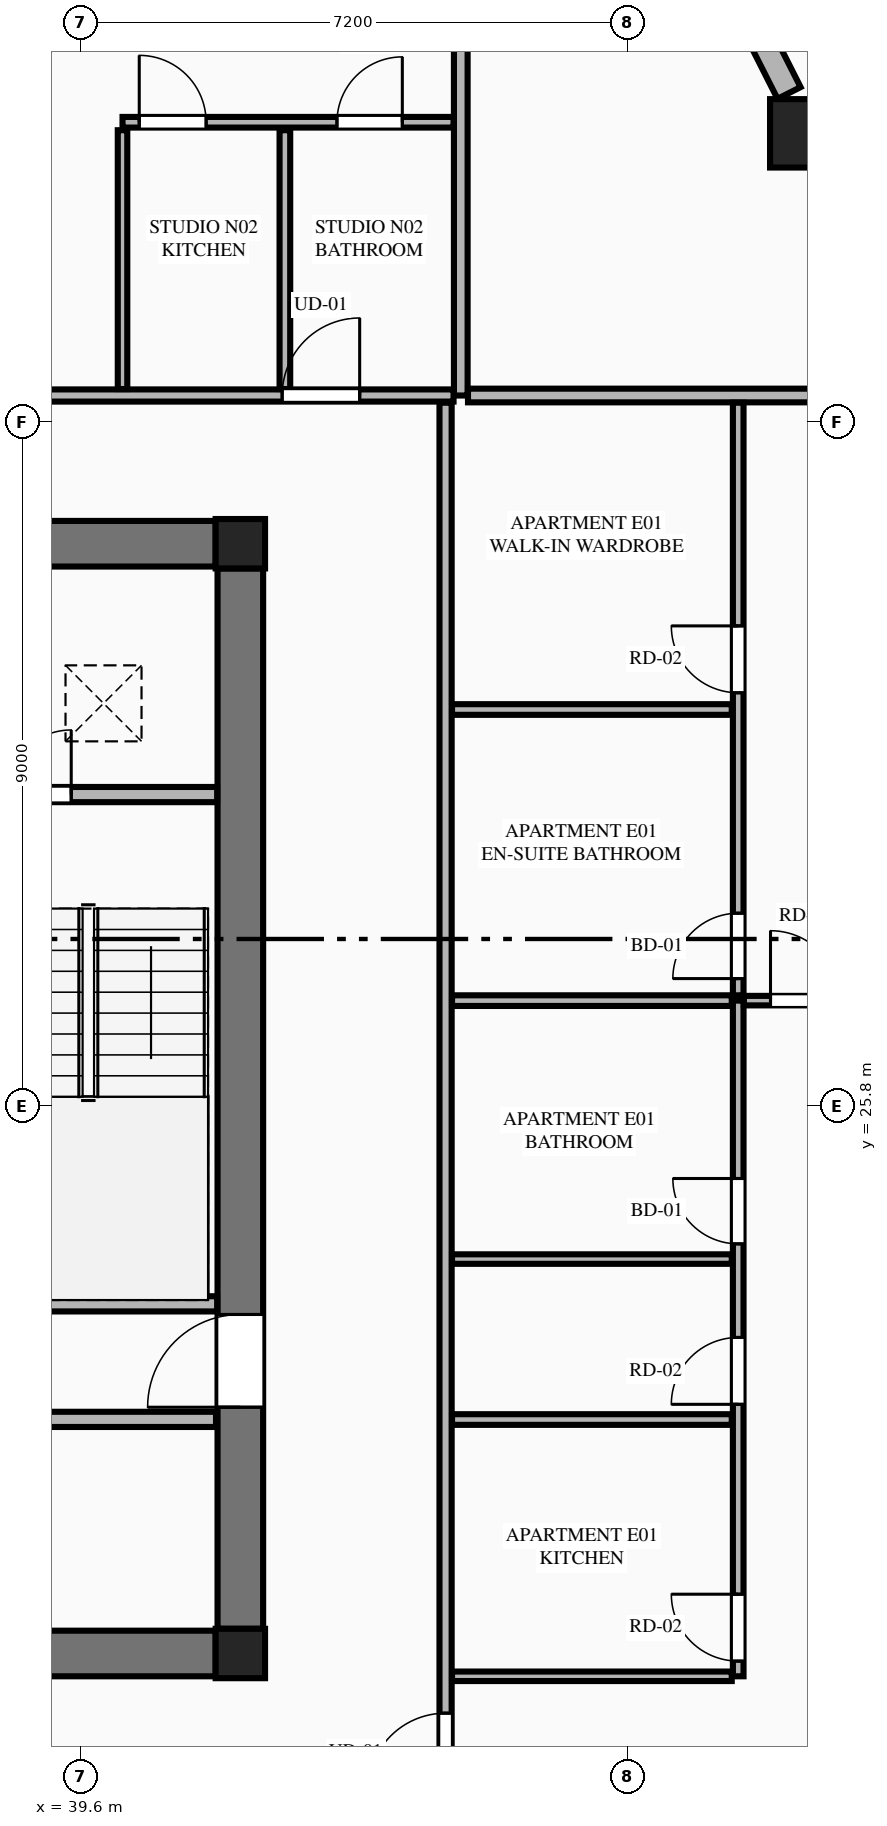
"""IFC4 building model, lengths in metres.
Left out: names, types, materials, properties, quantities, classifications, styles, units other than length and angle.
Written with IfcOpenShell. Run it as: python <this file> out.ifc"""

import sys

from ifc_helpers import new_model, si_unit, direction, frame, frame_2d, origin, origin_2d, place, context, subcontext, project, spatial, rectangle, extrude, element, fill, save


model = new_model("IFC4")
c1 = context("Model", 3, precision=1e-05, world=origin(), true_north=direction((0.0, 1.0)))
c2 = subcontext(c1, "Body", "Model", "MODEL_VIEW")
j1 = project(units=[si_unit("LENGTHUNIT", "METRE"), si_unit("PLANEANGLEUNIT", "RADIAN")], contexts=[c1])
p1 = place(None, origin())
s1 = spatial("IfcSite", under=j1, at=p1, CompositionType="ELEMENT")
p2 = place(p1, origin())
s2 = spatial("IfcBuilding", under=s1, at=p2, CompositionType="ELEMENT")
p3 = place(p2, frame((0.0, 0.0, 182.55)))
s3 = spatial("IfcBuildingStorey", under=s2, at=p3, CompositionType="ELEMENT", Elevation=182.55)
for number, where, z_axis, x_axis in (
    (1, (41.7, 18.6, 0.0), (0.0, 0.0, 1.0), (1.0, 0.0, 0.0)),
    (2, (41.7, 33.2, 0.0), (0.0, 0.0, 1.0), (1.0, 0.0, 0.0)),
):
    element("IfcColumn", number, at=place(p3, frame(where, z_axis=z_axis, x_axis=x_axis)), inside=s3, PredefinedType="COLUMN", context=c2, shape_type="SweptSolid", body=[
        extrude(rectangle(XDim=0.65, YDim=0.65, at=origin_2d()), origin(), (0.0, 0.0, 1.0), 3.55),
    ])
for number, where, z_axis, x_axis in (
    (3, (23.425, 18.6, 0.0), (0.0, 0.0, 1.0), (1.0, 0.0, 0.0)),
    (4, (23.425, 33.2, 0.0), (0.0, 0.0, 1.0), (1.0, 0.0, 0.0)),
):
    element("IfcWall", number, at=place(p3, frame(where, z_axis=z_axis, x_axis=x_axis)), inside=s3, PredefinedType="SHEAR", context=c2, shape_type="SweptSolid", body=[
        extrude(rectangle(XDim=17.95, YDim=0.6, at=frame_2d((8.975, 0.0))), origin(), (0.0, 0.0, 1.0), 3.35),
    ])
p4 = place(p3, frame((41.7, 18.925, 0.0), z_axis=(0.0, 0.0, 1.0), x_axis=(0.0, 1.0, 0.0)))
e5 = element("IfcWall", 5, at=p4, inside=s3, PredefinedType="SHEAR", context=c2, shape_type="SweptSolid", body=[
    extrude(rectangle(XDim=13.95, YDim=0.6, at=frame_2d((6.975, 0.0))), origin(), (0.0, 0.0, 1.0), 3.35),
])
p5 = place(p4, frame((2.915, 0.0, 0.0)))
e6 = element("IfcOpeningElement", 6, at=p5, cuts=e5, PredefinedType="OPENING", context=c2, shape_type="SweptSolid", body=[
    extrude(rectangle(XDim=1.22, YDim=2.25, at=frame_2d((0.61, 1.125))), frame((0.0, 0.31, 0.0), z_axis=(0.0, -1.0, 0.0), x_axis=(1.0, 0.0, 0.0)), (0.0, 0.0, 1.0), 0.62),
])
p6 = place(p3, frame((49.119, 38.599, 0.0), z_axis=(0.0, 0.0, 1.0), x_axis=(1.0, 0.0, 0.0)))
e7 = element("IfcColumn", 7, at=p6, inside=s3, PredefinedType="COLUMN", context=c2, shape_type="SweptSolid", body=[
    extrude(rectangle(XDim=0.9, YDim=0.9, at=origin_2d()), origin(), (0.0, 0.0, 1.0), 3.55),
])
p7 = place(p3, frame((38.125, 23.2, 0.0), z_axis=(0.0, 0.0, 1.0), x_axis=(1.0, 0.0, 0.0)))
e8 = element("IfcWall", 8, at=p7, inside=s3, PredefinedType="PLUMBINGWALL", context=c2, shape_type="SweptSolid", body=[
    extrude(rectangle(XDim=3.27, YDim=0.2, at=frame_2d((1.635, 0.0))), origin(), (0.0, 0.0, 1.0), 3.35),
])
p8 = place(p3, frame((38.125, 29.9, 0.0), z_axis=(0.0, 0.0, 1.0), x_axis=(1.0, 0.0, 0.0)))
e9 = element("IfcWall", 9, at=p8, inside=s3, PredefinedType="PLUMBINGWALL", context=c2, shape_type="SweptSolid", body=[
    extrude(rectangle(XDim=3.27, YDim=0.2, at=frame_2d((1.635, 0.0))), origin(), (0.0, 0.0, 1.0), 3.35),
])
p9 = place(p8, frame((0.5, 0.0, 0.0)))
e10 = element("IfcOpeningElement", 10, at=p9, cuts=e9, PredefinedType="OPENING", context=c2, shape_type="SweptSolid", body=[
    extrude(rectangle(XDim=0.85, YDim=2.05, at=frame_2d((0.425, 1.025))), frame((0.0, 0.11, 0.0), z_axis=(0.0, -1.0, 0.0), x_axis=(1.0, 0.0, 0.0)), (0.0, 0.0, 1.0), 0.22),
])
p10 = place(p3, frame((23.42, 21.68, 0.0), z_axis=(0.0, 0.0, 1.0), x_axis=(1.0, 0.0, 0.0)))
e11 = element("IfcWall", 11, at=p10, inside=s3, PredefinedType="PLUMBINGWALL", context=c2, shape_type="SweptSolid", body=[
    extrude(rectangle(XDim=17.96, YDim=0.2, at=frame_2d((8.98, 0.0))), origin(), (0.0, 0.0, 1.0), 3.35),
])
p11 = place(p10, frame((0.46, 0.0, 0.0)))
e12 = element("IfcOpeningElement", 12, at=p11, cuts=e11, PredefinedType="OPENING", context=c2, shape_type="SweptSolid", body=[
    extrude(rectangle(XDim=0.92, YDim=2.15, at=frame_2d((0.46, 1.075))), frame((0.0, 0.11, 0.0), z_axis=(0.0, -1.0, 0.0), x_axis=(1.0, 0.0, 0.0)), (0.0, 0.0, 1.0), 0.22),
])
p12 = place(p10, frame((6.48, 0.0, 0.0)))
e13 = element("IfcOpeningElement", 13, at=p12, cuts=e11, PredefinedType="OPENING", context=c2, shape_type="SweptSolid", body=[
    extrude(rectangle(XDim=0.92, YDim=2.15, at=frame_2d((0.46, 1.075))), frame((0.0, 0.11, 0.0), z_axis=(0.0, -1.0, 0.0), x_axis=(1.0, 0.0, 0.0)), (0.0, 0.0, 1.0), 0.22),
])
p13 = place(p10, frame((12.48, 0.0, 0.0)))
e14 = element("IfcOpeningElement", 14, at=p13, cuts=e11, PredefinedType="OPENING", context=c2, shape_type="SweptSolid", body=[
    extrude(rectangle(XDim=0.92, YDim=2.15, at=frame_2d((0.46, 1.075))), frame((0.0, 0.11, 0.0), z_axis=(0.0, -1.0, 0.0), x_axis=(1.0, 0.0, 0.0)), (0.0, 0.0, 1.0), 0.22),
])
p14 = place(p3, frame((48.919, 39.13, 0.0), z_axis=(0.0, 0.0, 1.0), x_axis=(-0.45150207307, 0.892270070109, 0.0)))
e15 = element("IfcWall", 15, at=p14, inside=s3, PredefinedType="STANDARD", context=c2, shape_type="SweptSolid", body=[
    extrude(rectangle(XDim=4.731, YDim=0.34, at=frame_2d((2.365, 0.0))), origin(), (0.0, 0.0, 1.0), 2.883),
])
p15 = place(p14, frame((1.815, 0.0, 0.75)))
e16 = element("IfcOpeningElement", 16, at=p15, cuts=e15, PredefinedType="OPENING", context=c2, shape_type="SweptSolid", body=[
    extrude(rectangle(XDim=1.1, YDim=1.983, at=frame_2d((0.55, 0.991))), frame((0.0, 0.18, 0.0), z_axis=(0.0, -1.0, 0.0), x_axis=(1.0, 0.0, 0.0)), (0.0, 0.0, 1.0), 0.36),
])
p16 = place(p3, frame((44.6, 35.15, 0.0), z_axis=(0.0, 0.0, 1.0), x_axis=(0.0, 1.0, 0.0)))
e17 = element("IfcWall", 17, at=p16, inside=s3, PredefinedType="PARTITIONING", context=c2, shape_type="SweptSolid", body=[
    extrude(rectangle(XDim=10.482, YDim=0.18, at=frame_2d((5.241, 0.0))), origin(), (0.0, 0.0, 1.0), 3.35),
])
p17 = place(p3, frame((36.038, 35.15, 0.0), z_axis=(0.0, 0.0, 1.0), x_axis=(1.0, 0.0, 0.0)))
e18 = element("IfcWall", 18, at=p17, inside=s3, PredefinedType="PARTITIONING", context=c2, shape_type="SweptSolid", body=[
    extrude(rectangle(XDim=8.467, YDim=0.16, at=frame_2d((4.233, 0.0))), origin(), (0.0, 0.0, 1.0), 3.35),
])
p18 = place(p17, frame((6.212, 0.0, 0.0)))
e19 = element("IfcOpeningElement", 19, at=p18, cuts=e18, PredefinedType="OPENING", context=c2, shape_type="SweptSolid", body=[
    extrude(rectangle(XDim=1.02, YDim=2.25, at=frame_2d((0.51, 1.125))), frame((0.0, 0.09, 0.0), z_axis=(0.0, -1.0, 0.0), x_axis=(1.0, 0.0, 0.0)), (0.0, 0.0, 1.0), 0.18),
])
p19 = place(p3, frame((40.15, 35.235, 0.0), z_axis=(0.0, 0.0, 1.0), x_axis=(0.0, 1.0, 0.0)))
e20 = element("IfcWall", 20, at=p19, inside=s3, PredefinedType="PARTITIONING", context=c2, shape_type="SweptSolid", body=[
    extrude(rectangle(XDim=3.405, YDim=0.125, at=frame_2d((1.702, 0.0))), origin(), (0.0, 0.0, 1.0), 3.35),
])
p20 = place(p3, frame((40.15, 38.745, 0.0), z_axis=(0.0, 0.0, 1.0), x_axis=(1.0, 0.0, 0.0)))
e21 = element("IfcWall", 21, at=p20, inside=s3, PredefinedType="PLUMBINGWALL", context=c2, shape_type="SweptSolid", body=[
    extrude(rectangle(XDim=4.355, YDim=0.14, at=frame_2d((2.177, 0.0))), origin(), (0.0, 0.0, 1.0), 3.35),
])
p21 = place(p20, frame((2.821, 0.0, 0.0)))
e22 = element("IfcOpeningElement", 22, at=p21, cuts=e21, PredefinedType="OPENING", context=c2, shape_type="SweptSolid", body=[
    extrude(rectangle(XDim=0.86, YDim=2.1, at=frame_2d((0.43, 1.05))), frame((0.0, 0.08, 0.0), z_axis=(0.0, -1.0, 0.0), x_axis=(1.0, 0.0, 0.0)), (0.0, 0.0, 1.0), 0.16),
])
p22 = place(p20, frame((0.22, 0.0, 0.0)))
e23 = element("IfcOpeningElement", 23, at=p22, cuts=e21, PredefinedType="OPENING", context=c2, shape_type="SweptSolid", body=[
    extrude(rectangle(XDim=0.88, YDim=2.15, at=frame_2d((0.44, 1.075))), frame((0.0, 0.08, 0.0), z_axis=(0.0, -1.0, 0.0), x_axis=(1.0, 0.0, 0.0)), (0.0, 0.0, 1.0), 0.16),
])
p23 = place(p3, frame((42.286, 35.235, 0.0), z_axis=(0.0, 0.0, 1.0), x_axis=(0.0, 1.0, 0.0)))
e24 = element("IfcWall", 24, at=p23, inside=s3, PredefinedType="PLUMBINGWALL", context=c2, shape_type="SweptSolid", body=[
    extrude(rectangle(XDim=3.405, YDim=0.14, at=frame_2d((1.702, 0.0))), origin(), (0.0, 0.0, 1.0), 2.807),
])
p24 = place(p3, frame((44.695, 35.15, 0.0), z_axis=(0.0, 0.0, 1.0), x_axis=(1.0, 0.0, 0.0)))
e25 = element("IfcWall", 25, at=p24, inside=s3, PredefinedType="PARTITIONING", context=c2, shape_type="SweptSolid", body=[
    extrude(rectangle(XDim=5.995, YDim=0.18, at=frame_2d((2.998, 0.0))), origin(), (0.0, 0.0, 1.0), 3.35),
])
p25 = place(p3, frame((44.4, 16.345, 0.0), z_axis=(0.0, 0.0, 1.0), x_axis=(0.0, 1.0, 0.0)))
e26 = element("IfcWall", 26, at=p25, inside=s3, PredefinedType="PARTITIONING", context=c2, shape_type="SweptSolid", body=[
    extrude(rectangle(XDim=18.71, YDim=0.16, at=frame_2d((9.355, 0.0))), origin(), (0.0, 0.0, 1.0), 3.35),
])
p26 = place(p25, frame((0.45, 0.0, 0.0)))
e27 = element("IfcOpeningElement", 27, at=p26, cuts=e26, PredefinedType="OPENING", context=c2, shape_type="SweptSolid", body=[
    extrude(rectangle(XDim=1.02, YDim=2.25, at=frame_2d((0.51, 1.125))), frame((0.0, 0.09, 0.0), z_axis=(0.0, -1.0, 0.0), x_axis=(1.0, 0.0, 0.0)), (0.0, 0.0, 1.0), 0.18),
])
p27 = place(p3, frame((44.485, 18.3, 0.0), z_axis=(0.0, 0.0, 1.0), x_axis=(1.0, 0.0, 0.0)))
e28 = element("IfcWall", 28, at=p27, inside=s3, PredefinedType="PARTITIONING", context=c2, shape_type="SweptSolid", body=[
    extrude(rectangle(XDim=3.68, YDim=0.125, at=frame_2d((1.84, 0.0))), origin(), (0.0, 0.0, 1.0), 2.807),
])
p28 = place(p3, frame((48.25, 18.3, 0.0), z_axis=(0.0, 0.0, 1.0), x_axis=(0.0, 1.0, 0.0)))
e29 = element("IfcWall", 29, at=p28, inside=s3, PredefinedType="PLUMBINGWALL", context=c2, shape_type="SweptSolid", body=[
    extrude(rectangle(XDim=8.889, YDim=0.14, at=frame_2d((4.444, 0.0))), origin(), (0.0, 0.0, 1.0), 3.35),
])
p29 = place(p28, frame((0.2, 0.0, 0.0)))
e30 = element("IfcOpeningElement", 30, at=p29, cuts=e29, PredefinedType="OPENING", context=c2, shape_type="SweptSolid", body=[
    extrude(rectangle(XDim=0.88, YDim=2.15, at=frame_2d((0.44, 1.075))), frame((0.0, 0.08, 0.0), z_axis=(0.0, -1.0, 0.0), x_axis=(1.0, 0.0, 0.0)), (0.0, 0.0, 1.0), 0.16),
])
p30 = place(p28, frame((3.578, 0.0, 0.0)))
e31 = element("IfcOpeningElement", 31, at=p30, cuts=e29, PredefinedType="OPENING", context=c2, shape_type="SweptSolid", body=[
    extrude(rectangle(XDim=0.88, YDim=2.15, at=frame_2d((0.44, 1.075))), frame((0.0, 0.08, 0.0), z_axis=(0.0, -1.0, 0.0), x_axis=(1.0, 0.0, 0.0)), (0.0, 0.0, 1.0), 0.16),
])
p31 = place(p28, frame((5.689, 0.0, 0.0)))
e32 = element("IfcOpeningElement", 32, at=p31, cuts=e29, PredefinedType="OPENING", context=c2, shape_type="SweptSolid", body=[
    extrude(rectangle(XDim=0.86, YDim=2.1, at=frame_2d((0.43, 1.05))), frame((0.0, 0.08, 0.0), z_axis=(0.0, -1.0, 0.0), x_axis=(1.0, 0.0, 0.0)), (0.0, 0.0, 1.0), 0.16),
])
p32 = place(p3, frame((48.25, 27.259, 0.0), z_axis=(0.0, 0.0, 1.0), x_axis=(0.0, 1.0, 0.0)))
e33 = element("IfcWall", 33, at=p32, inside=s3, PredefinedType="PLUMBINGWALL", context=c2, shape_type="SweptSolid", body=[
    extrude(rectangle(XDim=7.796, YDim=0.14, at=frame_2d((3.898, 0.0))), origin(), (0.0, 0.0, 1.0), 3.35),
])
p33 = place(p32, frame((0.22, 0.0, 0.0)))
e34 = element("IfcOpeningElement", 34, at=p33, cuts=e33, PredefinedType="OPENING", context=c2, shape_type="SweptSolid", body=[
    extrude(rectangle(XDim=0.86, YDim=2.1, at=frame_2d((0.43, 1.05))), frame((0.0, 0.08, 0.0), z_axis=(0.0, -1.0, 0.0), x_axis=(1.0, 0.0, 0.0)), (0.0, 0.0, 1.0), 0.16),
])
p34 = place(p32, frame((3.98, 0.0, 0.0)))
e35 = element("IfcOpeningElement", 35, at=p34, cuts=e33, PredefinedType="OPENING", context=c2, shape_type="SweptSolid", body=[
    extrude(rectangle(XDim=0.88, YDim=2.15, at=frame_2d((0.44, 1.075))), frame((0.0, 0.08, 0.0), z_axis=(0.0, -1.0, 0.0), x_axis=(1.0, 0.0, 0.0)), (0.0, 0.0, 1.0), 0.16),
])
p35 = place(p3, frame((44.485, 27.189, 0.0), z_axis=(0.0, 0.0, 1.0), x_axis=(1.0, 0.0, 0.0)))
e36 = element("IfcWall", 36, at=p35, inside=s3, PredefinedType="PLUMBINGWALL", context=c2, shape_type="SweptSolid", body=[
    extrude(rectangle(XDim=3.68, YDim=0.14, at=frame_2d((1.84, 0.0))), origin(), (0.0, 0.0, 1.0), 3.35),
])
p36 = place(p3, frame((48.325, 27.189, 0.0), z_axis=(0.0, 0.0, 1.0), x_axis=(1.0, 0.0, 0.0)))
e37 = element("IfcWall", 37, at=p36, inside=s3, PredefinedType="PARTITIONING", context=c2, shape_type="SweptSolid", body=[
    extrude(rectangle(XDim=6.408, YDim=0.125, at=frame_2d((3.204, 0.0))), origin(), (0.0, 0.0, 1.0), 3.35),
])
p37 = place(p36, frame((0.35, 0.0, 0.0)))
e38 = element("IfcOpeningElement", 38, at=p37, cuts=e37, PredefinedType="OPENING", context=c2, shape_type="SweptSolid", body=[
    extrude(rectangle(XDim=0.92, YDim=2.15, at=frame_2d((0.46, 1.075))), frame((0.0, 0.073, 0.0), z_axis=(0.0, -1.0, 0.0), x_axis=(1.0, 0.0, 0.0)), (0.0, 0.0, 1.0), 0.145),
])
p38 = place(p3, frame((44.485, 21.678, 0.0), z_axis=(0.0, 0.0, 1.0), x_axis=(1.0, 0.0, 0.0)))
e39 = element("IfcWall", 39, at=p38, inside=s3, PredefinedType="PLUMBINGWALL", context=c2, shape_type="SweptSolid", body=[
    extrude(rectangle(XDim=3.68, YDim=0.14, at=frame_2d((1.84, 0.0))), origin(), (0.0, 0.0, 1.0), 3.35),
])
p39 = place(p3, frame((44.485, 23.789, 0.0), z_axis=(0.0, 0.0, 1.0), x_axis=(1.0, 0.0, 0.0)))
e40 = element("IfcWall", 40, at=p39, inside=s3, PredefinedType="PARTITIONING", context=c2, shape_type="SweptSolid", body=[
    extrude(rectangle(XDim=3.68, YDim=0.125, at=frame_2d((1.84, 0.0))), origin(), (0.0, 0.0, 1.0), 2.807),
])
p40 = place(p3, frame((44.485, 31.019, 0.0), z_axis=(0.0, 0.0, 1.0), x_axis=(1.0, 0.0, 0.0)))
e41 = element("IfcWall", 41, at=p40, inside=s3, PredefinedType="PLUMBINGWALL", context=c2, shape_type="SweptSolid", body=[
    extrude(rectangle(XDim=3.68, YDim=0.14, at=frame_2d((1.84, 0.0))), origin(), (0.0, 0.0, 1.0), 3.35),
])
p41 = place(p5, origin())
e42 = element("IfcDoor", 42, at=p41, inside=s3, OperationType="SINGLE_SWING_LEFT", PredefinedType="DOOR", context=c2, shape_type="SweptSolid", body=[
    extrude(rectangle(XDim=1.22, YDim=2.25, at=frame_2d((0.61, 1.125))), frame((0.0, 0.025, 0.0), z_axis=(0.0, -1.0, 0.0), x_axis=(1.0, 0.0, 0.0)), (0.0, 0.0, 1.0), 0.05),
])
fill(e6, e42)
p42 = place(p9, origin())
e43 = element("IfcDoor", 43, at=p42, inside=s3, OperationType="SINGLE_SWING_RIGHT", PredefinedType="DOOR", context=c2, shape_type="SweptSolid", body=[
    extrude(rectangle(XDim=0.85, YDim=2.05, at=frame_2d((0.425, 1.025))), frame((0.0, 0.025, 0.0), z_axis=(0.0, -1.0, 0.0), x_axis=(1.0, 0.0, 0.0)), (0.0, 0.0, 1.0), 0.05),
])
fill(e10, e43)
p43 = place(p21, origin())
e44 = element("IfcDoor", 44, at=p43, inside=s3, OperationType="SINGLE_SWING_RIGHT", PredefinedType="DOOR", context=c2, shape_type="SweptSolid", body=[
    extrude(rectangle(XDim=0.86, YDim=2.1, at=frame_2d((0.43, 1.05))), frame((0.0, 0.025, 0.0), z_axis=(0.0, -1.0, 0.0), x_axis=(1.0, 0.0, 0.0)), (0.0, 0.0, 1.0), 0.05),
])
fill(e22, e44)
p44 = place(p18, origin())
e45 = element("IfcDoor", 45, at=p44, inside=s3, OperationType="SINGLE_SWING_RIGHT", PredefinedType="DOOR", context=c2, shape_type="SweptSolid", body=[
    extrude(rectangle(XDim=1.02, YDim=2.25, at=frame_2d((0.51, 1.125))), frame((0.0, 0.025, 0.0), z_axis=(0.0, -1.0, 0.0), x_axis=(1.0, 0.0, 0.0)), (0.0, 0.0, 1.0), 0.05),
])
fill(e19, e45)
p45 = place(p22, origin())
e46 = element("IfcDoor", 46, at=p45, inside=s3, OperationType="SINGLE_SWING_LEFT", PredefinedType="DOOR", context=c2, shape_type="SweptSolid", body=[
    extrude(rectangle(XDim=0.88, YDim=2.15, at=frame_2d((0.44, 1.075))), frame((0.0, 0.025, 0.0), z_axis=(0.0, -1.0, 0.0), x_axis=(1.0, 0.0, 0.0)), (0.0, 0.0, 1.0), 0.05),
])
fill(e23, e46)
p46 = place(p29, origin())
e47 = element("IfcDoor", 47, at=p46, inside=s3, OperationType="SINGLE_SWING_RIGHT", PredefinedType="DOOR", context=c2, shape_type="SweptSolid", body=[
    extrude(rectangle(XDim=0.88, YDim=2.15, at=frame_2d((0.44, 1.075))), frame((0.0, 0.025, 0.0), z_axis=(0.0, -1.0, 0.0), x_axis=(1.0, 0.0, 0.0)), (0.0, 0.0, 1.0), 0.05),
])
fill(e30, e47)
p47 = place(p30, origin())
e48 = element("IfcDoor", 48, at=p47, inside=s3, OperationType="SINGLE_SWING_LEFT", PredefinedType="DOOR", context=c2, shape_type="SweptSolid", body=[
    extrude(rectangle(XDim=0.88, YDim=2.15, at=frame_2d((0.44, 1.075))), frame((0.0, 0.025, 0.0), z_axis=(0.0, -1.0, 0.0), x_axis=(1.0, 0.0, 0.0)), (0.0, 0.0, 1.0), 0.05),
])
fill(e31, e48)
p48 = place(p31, origin())
e49 = element("IfcDoor", 49, at=p48, inside=s3, OperationType="SINGLE_SWING_RIGHT", PredefinedType="DOOR", context=c2, shape_type="SweptSolid", body=[
    extrude(rectangle(XDim=0.86, YDim=2.1, at=frame_2d((0.43, 1.05))), frame((0.0, 0.025, 0.0), z_axis=(0.0, -1.0, 0.0), x_axis=(1.0, 0.0, 0.0)), (0.0, 0.0, 1.0), 0.05),
])
fill(e32, e49)
p49 = place(p33, origin())
e50 = element("IfcDoor", 50, at=p49, inside=s3, OperationType="SINGLE_SWING_LEFT", PredefinedType="DOOR", context=c2, shape_type="SweptSolid", body=[
    extrude(rectangle(XDim=0.86, YDim=2.1, at=frame_2d((0.43, 1.05))), frame((0.0, 0.025, 0.0), z_axis=(0.0, -1.0, 0.0), x_axis=(1.0, 0.0, 0.0)), (0.0, 0.0, 1.0), 0.05),
])
fill(e34, e50)
p50 = place(p34, origin())
e51 = element("IfcDoor", 51, at=p50, inside=s3, OperationType="SINGLE_SWING_RIGHT", PredefinedType="DOOR", context=c2, shape_type="SweptSolid", body=[
    extrude(rectangle(XDim=0.88, YDim=2.15, at=frame_2d((0.44, 1.075))), frame((0.0, 0.025, 0.0), z_axis=(0.0, -1.0, 0.0), x_axis=(1.0, 0.0, 0.0)), (0.0, 0.0, 1.0), 0.05),
])
fill(e35, e51)
p51 = place(p26, origin())
e52 = element("IfcDoor", 52, at=p51, inside=s3, OperationType="SINGLE_SWING_LEFT", PredefinedType="DOOR", context=c2, shape_type="SweptSolid", body=[
    extrude(rectangle(XDim=1.02, YDim=2.25, at=frame_2d((0.51, 1.125))), frame((0.0, 0.025, 0.0), z_axis=(0.0, -1.0, 0.0), x_axis=(1.0, 0.0, 0.0)), (0.0, 0.0, 1.0), 0.05),
])
fill(e27, e52)
p52 = place(p37, origin())
e53 = element("IfcDoor", 53, at=p52, inside=s3, OperationType="SINGLE_SWING_LEFT", PredefinedType="DOOR", context=c2, shape_type="SweptSolid", body=[
    extrude(rectangle(XDim=0.92, YDim=2.15, at=frame_2d((0.46, 1.075))), frame((0.0, 0.025, 0.0), z_axis=(0.0, -1.0, 0.0), x_axis=(1.0, 0.0, 0.0)), (0.0, 0.0, 1.0), 0.05),
])
fill(e38, e53)
save(model, sys.argv[1])
